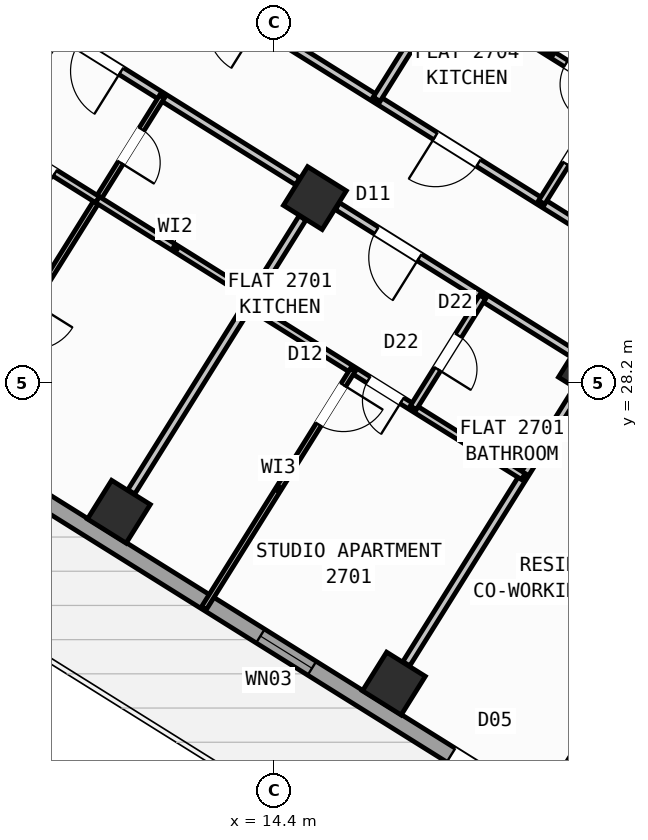
"""IFC4 building model, lengths in metres.
Left out: names, types, materials, properties, quantities, classifications, styles, units other than length and angle.
Written with IfcOpenShell. Run it as: python <this file> out.ifc"""

import sys

from ifc_helpers import new_model, si_unit, direction, frame, frame_2d, origin, origin_2d, place, context, subcontext, project, spatial, rectangle, hollow_rectangle, extrude, source, transform, mapped, element, fill, save


model = new_model("IFC4")
c1 = context("Model", 3, precision=1e-05, world=origin(), true_north=direction((0.0, 1.0)))
c2 = subcontext(c1, "Body", "Model", "MODEL_VIEW")
j1 = project(units=[si_unit("LENGTHUNIT", "METRE"), si_unit("PLANEANGLEUNIT", "RADIAN")], contexts=[c1])
p1 = place(None, origin())
s1 = spatial("IfcSite", under=j1, at=p1, CompositionType="ELEMENT")
p2 = place(p1, origin())
s2 = spatial("IfcBuilding", under=s1, at=p2, CompositionType="ELEMENT")
p3 = place(p2, frame((0.0, 0.0, 108.9)))
s3 = spatial("IfcBuildingStorey", under=s2, at=p3, CompositionType="ELEMENT", Elevation=108.9)
m1 = source(origin(), c2, "Body", "SweptSolid", [
    extrude(hollow_rectangle(XDim=0.9, YDim=0.9, WallThickness=0.036, at=origin_2d()), origin(), (0.0, 0.0, 1.0), 3.6),
])
for number, where, z_axis, x_axis in (
    (1, (20.632, 28.452, 0.0), (0.0, 0.0, 1.0), (-0.848, 0.53, 0.0)),
    (2, (16.764, 22.261, 0.0), (0.0, 0.0, 1.0), (-0.848, 0.53, 0.0)),
    (3, (15.205, 31.844, 0.0), (0.0, 0.0, 1.0), (-0.848, 0.53, 0.0)),
    (4, (11.336, 25.653, 0.0), (0.0, 0.0, 1.0), (-0.848, 0.53, 0.0)),
    (5, (9.777, 35.235, 0.0), (0.0, 0.0, 1.0), (-0.848, 0.53, 0.0)),
):
    element("IfcColumn", number, at=place(p3, frame(where, z_axis=z_axis, x_axis=x_axis)), inside=s3, PredefinedType="COLUMN", context=c2, shape_type="MappedRepresentation", body=[
        mapped(m1, transform((0.0, 0.0, 0.0), scale=1.0)),
    ])
p4 = place(p3, frame((31.76, 12.183, 0.0), z_axis=(0.0, 0.0, 1.0), x_axis=(-0.848047074256, 0.529920899612, 0.0)))
e6 = element("IfcWall", 6, at=p4, inside=s3, PredefinedType="STANDARD", context=c2, shape_type="SweptSolid", body=[
    extrude(rectangle(XDim=30.652, YDim=0.32, at=frame_2d((15.326, 0.0))), origin(), (0.0, 0.0, 1.0), 3.35),
])
p5 = place(p4, frame((15.153, 0.0, 0.0)))
e7 = element("IfcOpeningElement", 7, at=p5, cuts=e6, PredefinedType="OPENING", context=c2, shape_type="SweptSolid", body=[
    extrude(rectangle(XDim=1.2, YDim=2.15, at=frame_2d((0.6, 1.075))), frame((0.0, 0.17, 0.0), z_axis=(0.0, -1.0, 0.0), x_axis=(1.0, 0.0, 0.0)), (0.0, 0.0, 1.0), 0.34),
])
p6 = place(p4, frame((2.002, 0.0, 0.8)))
e8 = element("IfcOpeningElement", 8, at=p6, cuts=e6, PredefinedType="OPENING", context=c2, shape_type="SweptSolid", body=[
    extrude(rectangle(XDim=2.1, YDim=1.55, at=frame_2d((1.05, 0.775))), frame((0.0, 0.17, 0.0), z_axis=(0.0, -1.0, 0.0), x_axis=(1.0, 0.0, 0.0)), (0.0, 0.0, 1.0), 0.34),
])
p7 = place(p4, frame((7.206, 0.0, 0.8)))
e9 = element("IfcOpeningElement", 9, at=p7, cuts=e6, PredefinedType="OPENING", context=c2, shape_type="SweptSolid", body=[
    extrude(rectangle(XDim=2.1, YDim=1.55, at=frame_2d((1.05, 0.775))), frame((0.0, 0.17, 0.0), z_axis=(0.0, -1.0, 0.0), x_axis=(1.0, 0.0, 0.0)), (0.0, 0.0, 1.0), 0.34),
])
p8 = place(p4, frame((12.648, 0.0, 1.0)))
e10 = element("IfcOpeningElement", 10, at=p8, cuts=e6, PredefinedType="OPENING", context=c2, shape_type="SweptSolid", body=[
    extrude(rectangle(XDim=0.9, YDim=1.25, at=frame_2d((0.45, 0.625))), frame((0.0, 0.17, 0.0), z_axis=(0.0, -1.0, 0.0), x_axis=(1.0, 0.0, 0.0)), (0.0, 0.0, 1.0), 0.34),
])
p9 = place(p4, frame((19.59, 0.0, 0.95)))
e11 = element("IfcOpeningElement", 11, at=p9, cuts=e6, PredefinedType="OPENING", context=c2, shape_type="SweptSolid", body=[
    extrude(rectangle(XDim=1.2, YDim=1.4, at=frame_2d((0.6, 0.7))), frame((0.0, 0.17, 0.0), z_axis=(0.0, -1.0, 0.0), x_axis=(1.0, 0.0, 0.0)), (0.0, 0.0, 1.0), 0.34),
])
p10 = place(p4, frame((25.966, 0.0, 1.0)))
e12 = element("IfcOpeningElement", 12, at=p10, cuts=e6, PredefinedType="OPENING", context=c2, shape_type="SweptSolid", body=[
    extrude(rectangle(XDim=0.9, YDim=1.25, at=frame_2d((0.45, 0.625))), frame((0.0, 0.17, 0.0), z_axis=(0.0, -1.0, 0.0), x_axis=(1.0, 0.0, 0.0)), (0.0, 0.0, 1.0), 0.34),
])
p11 = place(p4, frame((28.871, 0.0, 1.0)))
e13 = element("IfcOpeningElement", 13, at=p11, cuts=e6, PredefinedType="OPENING", context=c2, shape_type="SweptSolid", body=[
    extrude(rectangle(XDim=0.9, YDim=1.25, at=frame_2d((0.45, 0.625))), frame((0.0, 0.17, 0.0), z_axis=(0.0, -1.0, 0.0), x_axis=(1.0, 0.0, 0.0)), (0.0, 0.0, 1.0), 0.34),
])
p12 = place(p3, frame((5.7, 28.71, 0.0), z_axis=(0.0, 0.0, 1.0), x_axis=(0.529923711467, 0.8480453172, 0.0)))
e14 = element("IfcWall", 14, at=p12, inside=s3, PredefinedType="STANDARD", context=c2, shape_type="SweptSolid", body=[
    extrude(rectangle(XDim=21.587, YDim=0.32, at=frame_2d((10.794, 0.0))), origin(), (0.0, 0.0, 1.0), 2.775),
])
p13 = place(p12, frame((1.984, 0.0, 0.8)))
e15 = element("IfcOpeningElement", 15, at=p13, cuts=e14, PredefinedType="OPENING", context=c2, shape_type="SweptSolid", body=[
    extrude(rectangle(XDim=2.1, YDim=1.55, at=frame_2d((1.05, 0.775))), frame((0.0, 0.17, 0.0), z_axis=(0.0, -1.0, 0.0), x_axis=(1.0, 0.0, 0.0)), (0.0, 0.0, 1.0), 0.34),
])
p14 = place(p12, frame((11.459, 0.0, 0.85)))
e16 = element("IfcOpeningElement", 16, at=p14, cuts=e14, PredefinedType="OPENING", context=c2, shape_type="SweptSolid", body=[
    extrude(rectangle(XDim=1.8, YDim=1.5, at=frame_2d((0.9, 0.75))), frame((0.0, 0.17, 0.0), z_axis=(0.0, -1.0, 0.0), x_axis=(1.0, 0.0, 0.0)), (0.0, 0.0, 1.0), 0.34),
])
p15 = place(p12, frame((18.335, 0.0, 0.85)))
e17 = element("IfcOpeningElement", 17, at=p15, cuts=e14, PredefinedType="OPENING", context=c2, shape_type="SweptSolid", body=[
    extrude(rectangle(XDim=1.5, YDim=1.5, at=frame_2d((0.75, 0.75))), frame((0.0, 0.17, 0.0), z_axis=(0.0, -1.0, 0.0), x_axis=(1.0, 0.0, 0.0)), (0.0, 0.0, 1.0), 0.34),
])
p16 = place(p3, frame((17.424, 47.083, 0.0), z_axis=(0.0, 0.0, 1.0), x_axis=(0.848049927979, -0.529916332693, 0.0)))
e18 = element("IfcWall", 18, at=p16, inside=s3, PredefinedType="STANDARD", context=c2, shape_type="SweptSolid", body=[
    extrude(rectangle(XDim=29.223, YDim=0.32, at=frame_2d((14.612, 0.0))), origin(), (0.0, 0.0, 1.0), 3.35),
])
p17 = place(p16, frame((3.77, 0.0, 0.0)))
e19 = element("IfcOpeningElement", 19, at=p17, cuts=e18, PredefinedType="OPENING", context=c2, shape_type="SweptSolid", body=[
    extrude(rectangle(XDim=1.05, YDim=2.15, at=frame_2d((0.525, 1.075))), frame((0.0, 0.17, 0.0), z_axis=(0.0, -1.0, 0.0), x_axis=(1.0, 0.0, 0.0)), (0.0, 0.0, 1.0), 0.34),
])
p18 = place(p16, frame((0.9, 0.0, 0.8)))
e20 = element("IfcOpeningElement", 20, at=p18, cuts=e18, PredefinedType="OPENING", context=c2, shape_type="SweptSolid", body=[
    extrude(rectangle(XDim=2.1, YDim=1.55, at=frame_2d((1.05, 0.775))), frame((0.0, 0.17, 0.0), z_axis=(0.0, -1.0, 0.0), x_axis=(1.0, 0.0, 0.0)), (0.0, 0.0, 1.0), 0.34),
])
p19 = place(p16, frame((6.972, 0.0, 1.0)))
e21 = element("IfcOpeningElement", 21, at=p19, cuts=e18, PredefinedType="OPENING", context=c2, shape_type="SweptSolid", body=[
    extrude(rectangle(XDim=0.9, YDim=1.25, at=frame_2d((0.45, 0.625))), frame((0.0, 0.17, 0.0), z_axis=(0.0, -1.0, 0.0), x_axis=(1.0, 0.0, 0.0)), (0.0, 0.0, 1.0), 0.34),
])
p20 = place(p16, frame((9.847, 0.0, 0.85)))
e22 = element("IfcOpeningElement", 22, at=p20, cuts=e18, PredefinedType="OPENING", context=c2, shape_type="SweptSolid", body=[
    extrude(rectangle(XDim=1.5, YDim=1.5, at=frame_2d((0.75, 0.75))), frame((0.0, 0.17, 0.0), z_axis=(0.0, -1.0, 0.0), x_axis=(1.0, 0.0, 0.0)), (0.0, 0.0, 1.0), 0.34),
])
p21 = place(p16, frame((13.889, 0.0, 0.95)))
e23 = element("IfcOpeningElement", 23, at=p21, cuts=e18, PredefinedType="OPENING", context=c2, shape_type="SweptSolid", body=[
    extrude(rectangle(XDim=1.2, YDim=1.4, at=frame_2d((0.6, 0.7))), frame((0.0, 0.17, 0.0), z_axis=(0.0, -1.0, 0.0), x_axis=(1.0, 0.0, 0.0)), (0.0, 0.0, 1.0), 0.34),
])
p22 = place(p16, frame((17.254, 0.0, 1.0)))
e24 = element("IfcOpeningElement", 24, at=p22, cuts=e18, PredefinedType="OPENING", context=c2, shape_type="SweptSolid", body=[
    extrude(rectangle(XDim=0.9, YDim=1.25, at=frame_2d((0.45, 0.625))), frame((0.0, 0.17, 0.0), z_axis=(0.0, -1.0, 0.0), x_axis=(1.0, 0.0, 0.0)), (0.0, 0.0, 1.0), 0.34),
])
p23 = place(p16, frame((20.764, 0.0, 0.8)))
e25 = element("IfcOpeningElement", 25, at=p23, cuts=e18, PredefinedType="OPENING", context=c2, shape_type="SweptSolid", body=[
    extrude(rectangle(XDim=2.1, YDim=1.55, at=frame_2d((1.05, 0.775))), frame((0.0, 0.17, 0.0), z_axis=(0.0, -1.0, 0.0), x_axis=(1.0, 0.0, 0.0)), (0.0, 0.0, 1.0), 0.34),
])
p24 = place(p16, frame((25.403, 0.0, 0.8)))
e26 = element("IfcOpeningElement", 26, at=p24, cuts=e18, PredefinedType="OPENING", context=c2, shape_type="SweptSolid", body=[
    extrude(rectangle(XDim=2.1, YDim=1.55, at=frame_2d((1.05, 0.775))), frame((0.0, 0.17, 0.0), z_axis=(0.0, -1.0, 0.0), x_axis=(1.0, 0.0, 0.0)), (0.0, 0.0, 1.0), 0.34),
])
p25 = place(p3, frame((23.899, 26.529, 0.0), z_axis=(0.0, 0.0, 1.0), x_axis=(-0.529920662441, -0.848047222457, 0.0)))
e27 = element("IfcWall", 27, at=p25, inside=s3, PredefinedType="PARTITIONING", context=c2, shape_type="SweptSolid", body=[
    extrude(rectangle(XDim=7.85, YDim=0.16, at=frame_2d((3.925, 0.0))), origin(), (0.0, 0.0, 1.0), 3.34),
])
p26 = place(p3, frame((25.065, 28.394, 0.0), z_axis=(0.0, 0.0, 1.0), x_axis=(-0.848048310262, 0.529918921593, 0.0)))
e28 = element("IfcWall", 28, at=p26, inside=s3, PredefinedType="PARTITIONING", context=c2, shape_type="SweptSolid", body=[
    extrude(rectangle(XDim=16.73, YDim=0.16, at=frame_2d((8.365, 0.0))), origin(), (0.0, 0.0, 1.0), 3.34),
])
p27 = place(p26, frame((2.22, 0.0, 0.0)))
e29 = element("IfcOpeningElement", 29, at=p27, cuts=e28, PredefinedType="OPENING", context=c2, shape_type="SweptSolid", body=[
    extrude(rectangle(XDim=0.86, YDim=2.05, at=frame_2d((0.43, 1.025))), frame((0.0, 0.09, 0.0), z_axis=(0.0, -1.0, 0.0), x_axis=(1.0, 0.0, 0.0)), (0.0, 0.0, 1.0), 0.18),
])
p28 = place(p26, frame((7.82, 0.0, 0.0)))
e30 = element("IfcOpeningElement", 30, at=p28, cuts=e28, PredefinedType="OPENING", context=c2, shape_type="SweptSolid", body=[
    extrude(rectangle(XDim=1.0, YDim=2.1, at=frame_2d((0.5, 1.05))), frame((0.0, 0.09, 0.0), z_axis=(0.0, -1.0, 0.0), x_axis=(1.0, 0.0, 0.0)), (0.0, 0.0, 1.0), 0.18),
])
p29 = place(p26, frame((12.95, 0.0, 0.0)))
e31 = element("IfcOpeningElement", 31, at=p29, cuts=e28, PredefinedType="OPENING", context=c2, shape_type="SweptSolid", body=[
    extrude(rectangle(XDim=1.0, YDim=2.1, at=frame_2d((0.5, 1.05))), frame((0.0, 0.09, 0.0), z_axis=(0.0, -1.0, 0.0), x_axis=(1.0, 0.0, 0.0)), (0.0, 0.0, 1.0), 0.18),
])
p30 = place(p3, frame((20.293, 28.782, 0.0), z_axis=(0.0, 0.0, 1.0), x_axis=(-0.848040881926, 0.529930809241, 0.0)))
e32 = element("IfcWall", 32, at=p30, inside=s3, PredefinedType="PARTITIONING", context=c2, shape_type="SweptSolid", body=[
    extrude(rectangle(XDim=5.476, YDim=0.16, at=frame_2d((2.738, 0.0))), origin(), (0.0, 0.0, 1.0), 2.775),
])
p31 = place(p30, frame((3.568, 0.0, 0.0)))
e33 = element("IfcOpeningElement", 33, at=p31, cuts=e32, PredefinedType="OPENING", context=c2, shape_type="SweptSolid", body=[
    extrude(rectangle(XDim=1.0, YDim=2.1, at=frame_2d((0.5, 1.05))), frame((0.0, 0.09, 0.0), z_axis=(0.0, -1.0, 0.0), x_axis=(1.0, 0.0, 0.0)), (0.0, 0.0, 1.0), 0.18),
])
p32 = place(p3, frame((14.866, 32.173, 0.0), z_axis=(0.0, 0.0, 1.0), x_axis=(-0.848053401719, 0.529910773464, 0.0)))
e34 = element("IfcWall", 34, at=p32, inside=s3, PredefinedType="PARTITIONING", context=c2, shape_type="SweptSolid", body=[
    extrude(rectangle(XDim=5.476, YDim=0.16, at=frame_2d((2.738, 0.0))), origin(), (0.0, 0.0, 1.0), 2.775),
])
p33 = place(p32, frame((4.108, 0.0, 0.0)))
e35 = element("IfcOpeningElement", 35, at=p33, cuts=e34, PredefinedType="OPENING", context=c2, shape_type="SweptSolid", body=[
    extrude(rectangle(XDim=1.0, YDim=2.1, at=frame_2d((0.5, 1.05))), frame((0.0, 0.09, 0.0), z_axis=(0.0, -1.0, 0.0), x_axis=(1.0, 0.0, 0.0)), (0.0, 0.0, 1.0), 0.18),
])
for number, where, z_axis, x_axis in (
    (36, (20.387, 28.06, 0.0), (0.0, 0.0, 1.0), (-0.53, -0.848, 0.0)),
    (37, (14.96, 31.452, 0.0), (0.0, 0.0, 1.0), (-0.53, -0.848, 0.0)),
):
    element("IfcWall", number, at=place(p3, frame(where, z_axis=z_axis, x_axis=x_axis)), inside=s3, PredefinedType="PARTITIONING", context=c2, shape_type="SweptSolid", body=[
        extrude(rectangle(XDim=6.376, YDim=0.16, at=frame_2d((3.188, 0.0))), origin(), (0.0, 0.0, 1.0), 2.775),
    ])
p34 = place(p3, frame((19.318, 26.349, 0.0), z_axis=(0.0, 0.0, 1.0), x_axis=(-0.848039019877, 0.529933789039, 0.0)))
e38 = element("IfcWall", 38, at=p34, inside=s3, PredefinedType="PLUMBINGWALL", context=c2, shape_type="SweptSolid", body=[
    extrude(rectangle(XDim=6.4, YDim=0.14, at=frame_2d((3.2, 0.0))), origin(), (0.0, 0.0, 1.0), 3.34),
])
p35 = place(p34, frame((2.824, 0.0, 0.0)))
e39 = element("IfcOpeningElement", 39, at=p35, cuts=e38, PredefinedType="OPENING", context=c2, shape_type="SweptSolid", body=[
    extrude(rectangle(XDim=0.78, YDim=2.05, at=frame_2d((0.39, 1.025))), frame((0.0, 0.08, 0.0), z_axis=(0.0, -1.0, 0.0), x_axis=(1.0, 0.0, 0.0)), (0.0, 0.0, 1.0), 0.16),
])
p36 = place(p3, frame((18.514, 29.894, 0.0), z_axis=(0.0, 0.0, 1.0), x_axis=(-0.529913878929, -0.848051461244, 0.0)))
e40 = element("IfcWall", 40, at=p36, inside=s3, PredefinedType="PLUMBINGWALL", context=c2, shape_type="SweptSolid", body=[
    extrude(rectangle(XDim=2.58, YDim=0.14, at=frame_2d((1.29, 0.0))), origin(), (0.0, 0.0, 1.0), 3.34),
])
p37 = place(p36, frame((0.9, 0.0, 0.0)))
e41 = element("IfcOpeningElement", 41, at=p37, cuts=e40, PredefinedType="OPENING", context=c2, shape_type="SweptSolid", body=[
    extrude(rectangle(XDim=0.78, YDim=2.05, at=frame_2d((0.39, 1.025))), frame((0.0, 0.08, 0.0), z_axis=(0.0, -1.0, 0.0), x_axis=(1.0, 0.0, 0.0)), (0.0, 0.0, 1.0), 0.16),
])
p38 = place(p3, frame((15.953, 28.452, 0.0), z_axis=(0.0, 0.0, 1.0), x_axis=(-0.529919714018, -0.848047815099, 0.0)))
e42 = element("IfcWall", 42, at=p38, inside=s3, PredefinedType="PARTITIONING", context=c2, shape_type="SweptSolid", body=[
    extrude(rectangle(XDim=5.54, YDim=0.11, at=frame_2d((2.77, 0.0))), origin(), (0.0, 0.0, 1.0), 3.34),
])
p39 = place(p38, frame((0.35, 0.0, 0.0)))
e43 = element("IfcOpeningElement", 43, at=p39, cuts=e42, PredefinedType="OPENING", context=c2, shape_type="SweptSolid", body=[
    extrude(rectangle(XDim=0.92, YDim=2.08, at=frame_2d((0.46, 1.04))), frame((0.0, 0.065, 0.0), z_axis=(0.0, -1.0, 0.0), x_axis=(1.0, 0.0, 0.0)), (0.0, 0.0, 1.0), 0.13),
])
p40 = place(p3, frame((12.188, 33.847, 0.0), z_axis=(0.0, 0.0, 1.0), x_axis=(-0.529917860021, -0.848048973604, 0.0)))
e44 = element("IfcWall", 44, at=p40, inside=s3, PredefinedType="PARTITIONING", context=c2, shape_type="SweptSolid", body=[
    extrude(rectangle(XDim=8.12, YDim=0.11, at=frame_2d((4.06, 0.0))), origin(), (0.0, 0.0, 1.0), 3.34),
])
p41 = place(p40, frame((0.76, 0.0, 0.0)))
e45 = element("IfcOpeningElement", 45, at=p41, cuts=e44, PredefinedType="OPENING", context=c2, shape_type="SweptSolid", body=[
    extrude(rectangle(XDim=0.78, YDim=2.05, at=frame_2d((0.39, 1.025))), frame((0.0, 0.065, 0.0), z_axis=(0.0, -1.0, 0.0), x_axis=(1.0, 0.0, 0.0)), (0.0, 0.0, 1.0), 0.13),
])
p42 = place(p40, frame((4.8, 0.0, 0.0)))
e46 = element("IfcOpeningElement", 46, at=p42, cuts=e44, PredefinedType="OPENING", context=c2, shape_type="SweptSolid", body=[
    extrude(rectangle(XDim=0.92, YDim=2.08, at=frame_2d((0.46, 1.04))), frame((0.0, 0.065, 0.0), z_axis=(0.0, -1.0, 0.0), x_axis=(1.0, 0.0, 0.0)), (0.0, 0.0, 1.0), 0.13),
])
p43 = place(p3, frame((10.916, 31.811, 0.0), z_axis=(0.0, 0.0, 1.0), x_axis=(-0.84802195137, 0.529961102341, 0.0)))
e47 = element("IfcWall", 47, at=p43, inside=s3, PredefinedType="PLUMBINGWALL", context=c2, shape_type="SweptSolid", body=[
    extrude(rectangle(XDim=2.9, YDim=0.14, at=frame_2d((1.45, 0.0))), origin(), (0.0, 0.0, 1.0), 3.34),
])
p44 = place(p43, frame((0.99, 0.0, 0.0)))
e48 = element("IfcOpeningElement", 48, at=p44, cuts=e47, PredefinedType="OPENING", context=c2, shape_type="SweptSolid", body=[
    extrude(rectangle(XDim=0.92, YDim=2.08, at=frame_2d((0.46, 1.04))), frame((0.0, 0.08, 0.0), z_axis=(0.0, -1.0, 0.0), x_axis=(1.0, 0.0, 0.0)), (0.0, 0.0, 1.0), 0.16),
])
p45 = place(p3, frame((13.986, 29.893, 0.0), z_axis=(0.0, 0.0, 1.0), x_axis=(-0.848051346257, 0.52991406295, 0.0)))
e49 = element("IfcWall", 49, at=p45, inside=s3, PredefinedType="PLUMBINGWALL", context=c2, shape_type="SweptSolid", body=[
    extrude(rectangle(XDim=3.62, YDim=0.14, at=frame_2d((1.81, 0.0))), origin(), (0.0, 0.0, 1.0), 3.34),
])
p46 = place(p3, frame((18.828, 37.643, 0.0), z_axis=(0.0, 0.0, 1.0), x_axis=(-0.529926399231, -0.848043637673, 0.0)))
e50 = element("IfcWall", 50, at=p46, inside=s3, PredefinedType="PARTITIONING", context=c2, shape_type="SweptSolid", body=[
    extrude(rectangle(XDim=4.538, YDim=0.16, at=frame_2d((2.269, 0.0))), origin(), (0.0, 0.0, 1.0), 2.775),
])
p47 = place(p3, frame((23.218, 32.591, 0.0), z_axis=(0.0, 0.0, 1.0), x_axis=(-0.848056163074, 0.529906354247, 0.0)))
e51 = element("IfcWall", 51, at=p47, inside=s3, PredefinedType="PLUMBINGWALL", context=c2, shape_type="SweptSolid", body=[
    extrude(rectangle(XDim=6.4, YDim=0.14, at=frame_2d((3.2, 0.0))), origin(), (0.0, 0.0, 1.0), 3.34),
])
p48 = place(p47, frame((2.824, 0.0, 0.0)))
e52 = element("IfcOpeningElement", 52, at=p48, cuts=e51, PredefinedType="OPENING", context=c2, shape_type="SweptSolid", body=[
    extrude(rectangle(XDim=0.78, YDim=2.05, at=frame_2d((0.39, 1.025))), frame((0.0, 0.08, 0.0), z_axis=(0.0, -1.0, 0.0), x_axis=(1.0, 0.0, 0.0)), (0.0, 0.0, 1.0), 0.16),
])
p49 = place(p3, frame((21.047, 33.947, 0.0), z_axis=(0.0, 0.0, 1.0), x_axis=(-0.529913878929, -0.848051461244, 0.0)))
e53 = element("IfcWall", 53, at=p49, inside=s3, PredefinedType="PLUMBINGWALL", context=c2, shape_type="SweptSolid", body=[
    extrude(rectangle(XDim=2.58, YDim=0.14, at=frame_2d((1.29, 0.0))), origin(), (0.0, 0.0, 1.0), 3.34),
])
p50 = place(p49, frame((0.9, 0.0, 0.0)))
e54 = element("IfcOpeningElement", 54, at=p50, cuts=e53, PredefinedType="OPENING", context=c2, shape_type="SweptSolid", body=[
    extrude(rectangle(XDim=0.78, YDim=2.05, at=frame_2d((0.39, 1.025))), frame((0.0, 0.08, 0.0), z_axis=(0.0, -1.0, 0.0), x_axis=(1.0, 0.0, 0.0)), (0.0, 0.0, 1.0), 0.16),
])
p51 = place(p3, frame((24.802, 42.614, 0.0), z_axis=(0.0, 0.0, 1.0), x_axis=(-0.529926099889, -0.848043824727, 0.0)))
e55 = element("IfcWall", 55, at=p51, inside=s3, PredefinedType="PARTITIONING", context=c2, shape_type="SweptSolid", body=[
    extrude(rectangle(XDim=9.34, YDim=0.11, at=frame_2d((4.67, 0.0))), origin(), (0.0, 0.0, 1.0), 3.34),
])
p52 = place(p51, frame((0.47, 0.0, 0.0)))
e56 = element("IfcOpeningElement", 56, at=p52, cuts=e55, PredefinedType="OPENING", context=c2, shape_type="SweptSolid", body=[
    extrude(rectangle(XDim=0.92, YDim=2.08, at=frame_2d((0.46, 1.04))), frame((0.0, 0.065, 0.0), z_axis=(0.0, -1.0, 0.0), x_axis=(1.0, 0.0, 0.0)), (0.0, 0.0, 1.0), 0.13),
])
m2 = source(origin(), c2, "Body", "SweptSolid", [
    extrude(rectangle(XDim=1.2, YDim=2.15, at=frame_2d((0.6, 1.075))), frame((0.0, 0.025, 0.0), z_axis=(0.0, -1.0, 0.0), x_axis=(1.0, 0.0, 0.0)), (0.0, 0.0, 1.0), 0.05),
])
p53 = place(p5, origin())
e57 = element("IfcDoor", 57, at=p53, inside=s3, OperationType="SINGLE_SWING_LEFT", PredefinedType="DOOR", context=c2, shape_type="MappedRepresentation", body=[
    mapped(m2, transform((0.0, 0.0, 0.0), scale=1.0)),
])
fill(e7, e57)
m3 = source(origin(), c2, "Body", "SweptSolid", [
    extrude(rectangle(XDim=1.2, YDim=1.4, at=frame_2d((0.6, 0.7))), frame((0.0, 0.03, 0.0), z_axis=(0.0, -1.0, 0.0), x_axis=(1.0, 0.0, 0.0)), (0.0, 0.0, 1.0), 0.06),
])
p54 = place(p9, origin())
e58 = element("IfcWindow", 58, at=p54, inside=s3, PartitioningType="SINGLE_PANEL", PredefinedType="WINDOW", context=c2, shape_type="MappedRepresentation", body=[
    mapped(m3, transform((0.0, 0.0, 0.0), scale=1.0)),
])
fill(e11, e58)
m4 = source(origin(), c2, "Body", "SweptSolid", [
    extrude(rectangle(XDim=0.92, YDim=2.08, at=frame_2d((0.46, 1.04))), frame((0.0, 0.025, 0.0), z_axis=(0.0, -1.0, 0.0), x_axis=(1.0, 0.0, 0.0)), (0.0, 0.0, 1.0), 0.05),
])
p55 = place(p39, origin())
e59 = element("IfcDoor", 59, at=p55, inside=s3, OperationType="SINGLE_SWING_LEFT", PredefinedType="DOOR", context=c2, shape_type="MappedRepresentation", body=[
    mapped(m4, transform((0.0, 0.0, 0.0), scale=1.0)),
])
fill(e43, e59)
m5 = source(origin(), c2, "Body", "SweptSolid", [
    extrude(rectangle(XDim=1.0, YDim=2.1, at=frame_2d((0.5, 1.05))), frame((0.0, 0.025, 0.0), z_axis=(0.0, -1.0, 0.0), x_axis=(1.0, 0.0, 0.0)), (0.0, 0.0, 1.0), 0.05),
])
p56 = place(p31, origin())
e60 = element("IfcDoor", 60, at=p56, inside=s3, OperationType="SINGLE_SWING_LEFT", PredefinedType="DOOR", context=c2, shape_type="MappedRepresentation", body=[
    mapped(m5, transform((0.0, 0.0, 0.0), scale=1.0)),
])
fill(e33, e60)
m6 = source(origin(), c2, "Body", "SweptSolid", [
    extrude(rectangle(XDim=0.78, YDim=2.05, at=frame_2d((0.39, 1.025))), frame((0.0, 0.025, 0.0), z_axis=(0.0, -1.0, 0.0), x_axis=(1.0, 0.0, 0.0)), (0.0, 0.0, 1.0), 0.05),
])
p57 = place(p35, origin())
e61 = element("IfcDoor", 61, at=p57, inside=s3, OperationType="SINGLE_SWING_LEFT", PredefinedType="DOOR", context=c2, shape_type="MappedRepresentation", body=[
    mapped(m6, transform((0.0, 0.0, 0.0), scale=1.0)),
])
fill(e39, e61)
p58 = place(p37, origin())
e62 = element("IfcDoor", 62, at=p58, inside=s3, OperationType="SINGLE_SWING_RIGHT", PredefinedType="DOOR", context=c2, shape_type="MappedRepresentation", body=[
    mapped(m6, transform((0.0, 0.0, 0.0), scale=1.0)),
])
fill(e41, e62)
p59 = place(p33, origin())
e63 = element("IfcDoor", 63, at=p59, inside=s3, OperationType="SINGLE_SWING_LEFT", PredefinedType="DOOR", context=c2, shape_type="MappedRepresentation", body=[
    mapped(m5, transform((0.0, 0.0, 0.0), scale=1.0)),
])
fill(e35, e63)
p60 = place(p44, origin())
e64 = element("IfcDoor", 64, at=p60, inside=s3, OperationType="SINGLE_SWING_LEFT", PredefinedType="DOOR", context=c2, shape_type="MappedRepresentation", body=[
    mapped(m4, transform((0.0, 0.0, 0.0), scale=1.0)),
])
fill(e48, e64)
p61 = place(p41, origin())
e65 = element("IfcDoor", 65, at=p61, inside=s3, OperationType="SINGLE_SWING_RIGHT", PredefinedType="DOOR", context=c2, shape_type="MappedRepresentation", body=[
    mapped(m6, transform((0.0, 0.0, 0.0), scale=1.0)),
])
fill(e45, e65)
p62 = place(p28, origin())
e66 = element("IfcDoor", 66, at=p62, inside=s3, OperationType="SINGLE_SWING_RIGHT", PredefinedType="DOOR", context=c2, shape_type="MappedRepresentation", body=[
    mapped(m5, transform((0.0, 0.0, 0.0), scale=1.0)),
])
fill(e30, e66)
p63 = place(p48, origin())
e67 = element("IfcDoor", 67, at=p63, inside=s3, OperationType="SINGLE_SWING_LEFT", PredefinedType="DOOR", context=c2, shape_type="MappedRepresentation", body=[
    mapped(m6, transform((0.0, 0.0, 0.0), scale=1.0)),
])
fill(e52, e67)
p64 = place(p50, origin())
e68 = element("IfcDoor", 68, at=p64, inside=s3, OperationType="SINGLE_SWING_RIGHT", PredefinedType="DOOR", context=c2, shape_type="MappedRepresentation", body=[
    mapped(m6, transform((0.0, 0.0, 0.0), scale=1.0)),
])
fill(e54, e68)
save(model, sys.argv[1])
